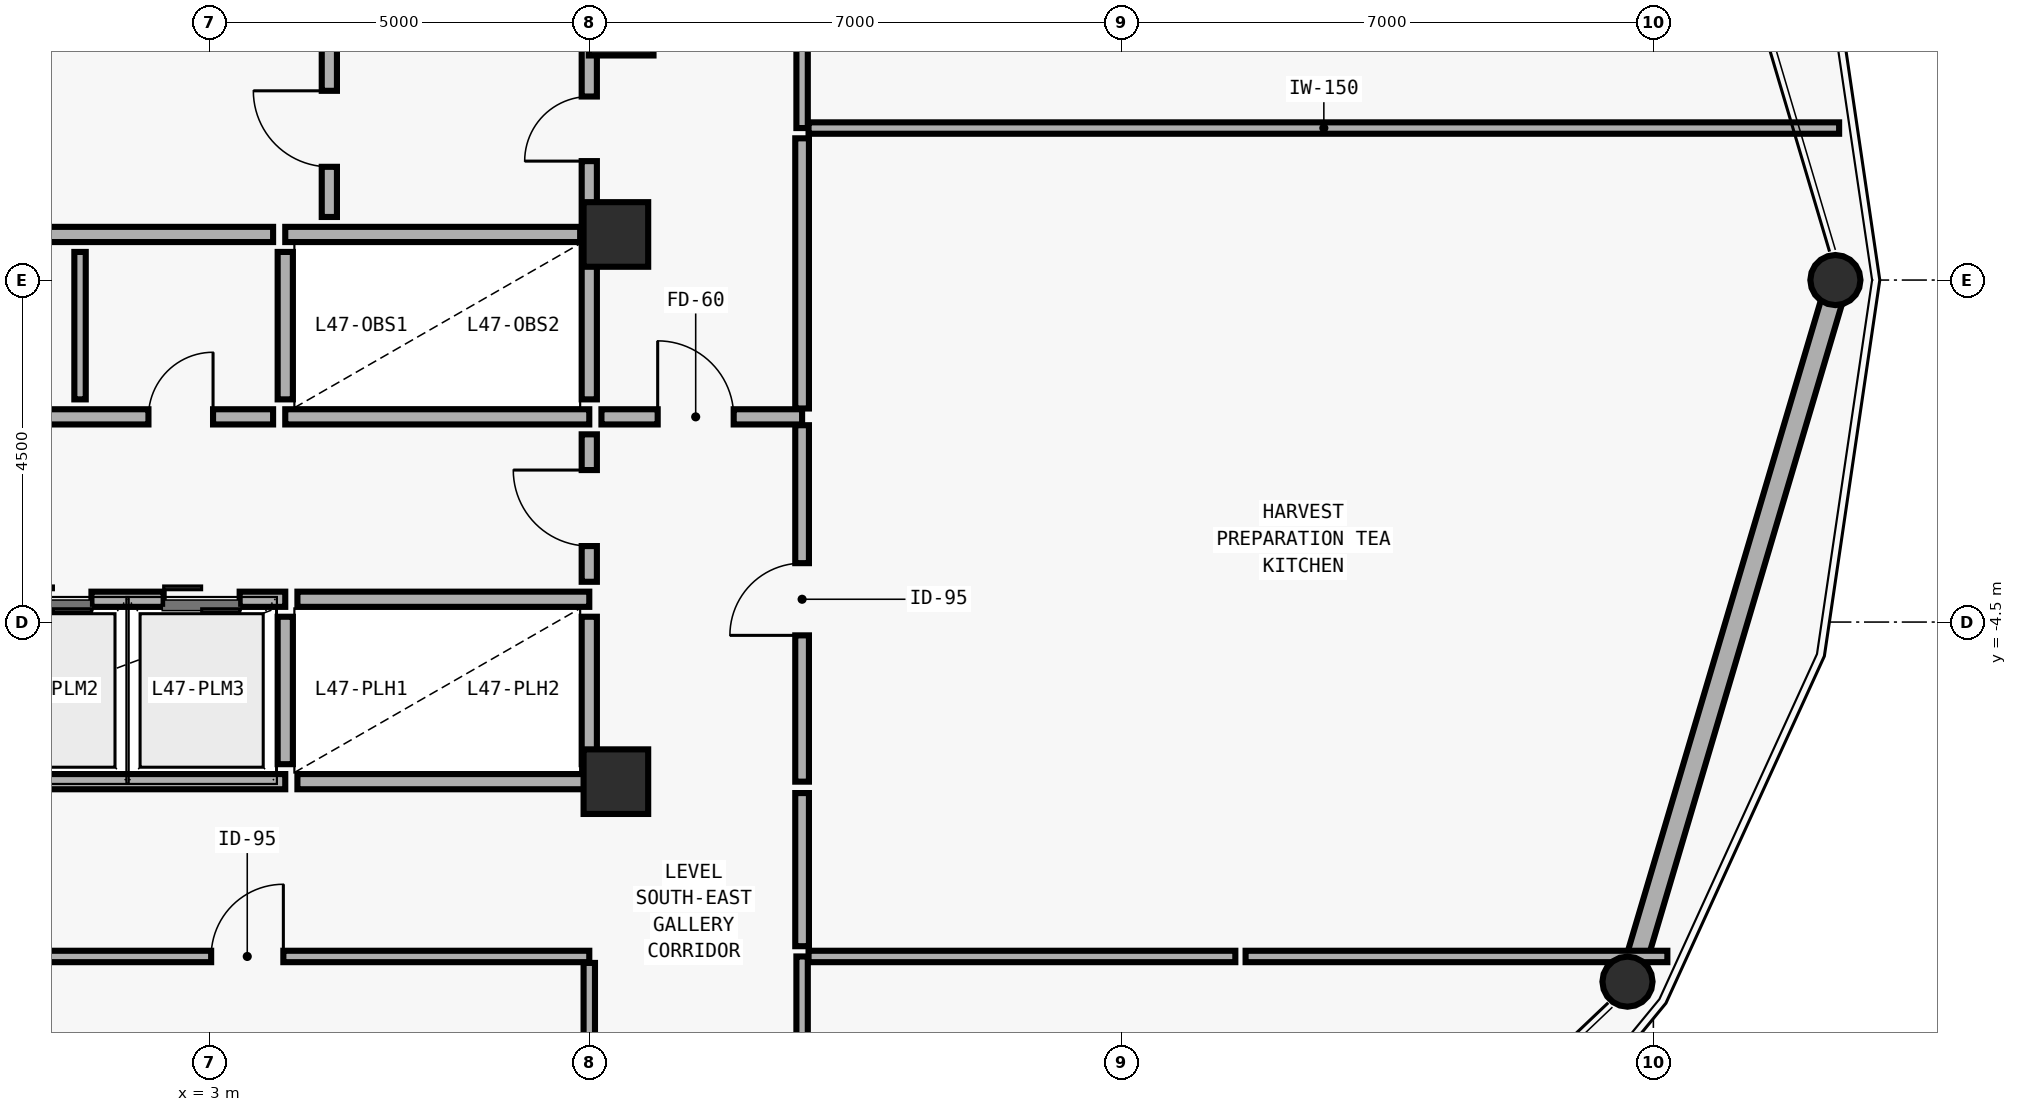
"""IFC4 building model, lengths in metres.
Left out: names, types, materials, properties, quantities, classifications, styles, units other than length and angle.
Written with IfcOpenShell. Run it as: python <this file> out.ifc"""

import sys

from ifc_helpers import new_model, si_unit, direction, frame, frame_2d, origin, origin_2d, place, context, subcontext, project, spatial, rectangle, hollow_circle, extrude, element, fill, save


model = new_model("IFC4")
c1 = context("Model", 3, precision=1e-05, world=origin(), true_north=direction((0.0, 1.0)))
c2 = subcontext(c1, "Body", "Model", "MODEL_VIEW")
j1 = project(units=[si_unit("LENGTHUNIT", "METRE"), si_unit("PLANEANGLEUNIT", "RADIAN")], contexts=[c1])
p1 = place(None, origin())
s1 = spatial("IfcSite", under=j1, at=p1, CompositionType="ELEMENT")
p2 = place(p1, origin())
s2 = spatial("IfcBuilding", under=s1, at=p2, CompositionType="ELEMENT")
p3 = place(p2, frame((0.0, 0.0, 189.6)))
s3 = spatial("IfcBuildingStorey", under=s2, at=p3, CompositionType="ELEMENT", Elevation=189.6)
for number, where, z_axis, x_axis in (
    (1, (8.42, 3.38, 0.0), (0.0, 0.0, 1.0), (1.0, 0.0, 0.0)),
    (2, (8.35, 0.6, 0.0), (0.0, 0.0, 1.0), (1.0, 0.0, 0.0)),
    (3, (8.35, -6.6, 0.0), (0.0, 0.0, 1.0), (1.0, 0.0, 0.0)),
):
    element("IfcColumn", number, at=place(p3, frame(where, z_axis=z_axis, x_axis=x_axis)), inside=s3, PredefinedType="COLUMN", context=c2, shape_type="SweptSolid", body=[
        extrude(rectangle(XDim=0.85, YDim=0.85, at=origin_2d()), origin(), (0.0, 0.0, 1.0), 3.575),
    ])
p4 = place(p3, frame((24.429, 0.0, 0.0), z_axis=(-0.018981760075, 0.0, 0.999819830162), x_axis=(0.0, -1.0, 0.0)))
e4 = element("IfcColumn", 4, at=p4, inside=s3, PredefinedType="COLUMN", context=c2, shape_type="SweptSolid", body=[
    extrude(hollow_circle(Radius=0.33, WallThickness=0.025, at=origin_2d()), origin(), (0.0, 0.0, 1.0), 3.576),
])
p5 = place(p3, frame((21.689, -9.24, 0.0), z_axis=(-0.016455959383, 0.00477973924, 0.999853166967), x_axis=(-0.278928739366, -0.960311802674, 0.0)))
e5 = element("IfcColumn", 5, at=p5, inside=s3, PredefinedType="COLUMN", context=c2, shape_type="SweptSolid", body=[
    extrude(hollow_circle(Radius=0.33, WallThickness=0.025, at=origin_2d()), origin(), (0.0, 0.0, 1.0), 3.575),
])
p6 = place(p3, frame((24.348, -0.273, 0.0), z_axis=(0.0, 0.0, 1.0), x_axis=(-0.2842909157, -0.958738063942, 0.0)))
e6 = element("IfcWall", 6, at=p6, inside=s3, PredefinedType="SOLIDWALL", context=c2, shape_type="SweptSolid", body=[
    extrude(rectangle(XDim=9.068, YDim=0.28, at=frame_2d((4.534, 0.0))), origin(), (0.0, 0.0, 1.0), 2.93),
])
p7 = place(p3, frame((4.0, 0.6, 0.0), z_axis=(0.0, 0.0, 1.0), x_axis=(1.0, 0.0, 0.0)))
e7 = element("IfcWall", 7, at=p7, inside=s3, PredefinedType="SOLIDWALL", context=c2, shape_type="SweptSolid", body=[
    extrude(rectangle(XDim=3.88, YDim=0.2, at=frame_2d((1.94, 0.0))), origin(), (0.0, 0.0, 1.0), 3.012),
])
p8 = place(p3, frame((4.0, -1.8, 0.0), z_axis=(0.0, 0.0, 1.0), x_axis=(1.0, 0.0, 0.0)))
e8 = element("IfcWall", 8, at=p8, inside=s3, PredefinedType="SOLIDWALL", context=c2, shape_type="SweptSolid", body=[
    extrude(rectangle(XDim=4.0, YDim=0.2, at=frame_2d((2.0, 0.0))), origin(), (0.0, 0.0, 1.0), 3.36),
])
p9 = place(p3, frame((4.0, -1.57, 0.0), z_axis=(0.0, 0.0, 1.0), x_axis=(0.0, 1.0, 0.0)))
e9 = element("IfcWall", 9, at=p9, inside=s3, PredefinedType="SOLIDWALL", context=c2, shape_type="SweptSolid", body=[
    extrude(rectangle(XDim=1.94, YDim=0.2, at=frame_2d((0.97, 0.0))), origin(), (0.0, 0.0, 1.0), 3.36),
])
p10 = place(p3, frame((8.0, -1.57, 0.0), z_axis=(0.0, 0.0, 1.0), x_axis=(0.0, 1.0, 0.0)))
e10 = element("IfcWall", 10, at=p10, inside=s3, PredefinedType="SOLIDWALL", context=c2, shape_type="SweptSolid", body=[
    extrude(rectangle(XDim=2.05, YDim=0.2, at=frame_2d((1.025, 0.0))), origin(), (0.0, 0.0, 1.0), 3.012),
])
p11 = place(p3, frame((-2.0, -4.2, 0.0), z_axis=(0.0, 0.0, 1.0), x_axis=(1.0, 0.0, 0.0)))
e11 = element("IfcWall", 11, at=p11, inside=s3, PredefinedType="SOLIDWALL", context=c2, shape_type="SweptSolid", body=[
    extrude(rectangle(XDim=6.0, YDim=0.2, at=frame_2d((3.0, 0.0))), origin(), (0.0, 0.0, 1.0), 3.36),
])
p12 = place(p11, frame((0.5, 0.0, 0.0)))
e12 = element("IfcOpeningElement", 12, at=p12, cuts=e11, PredefinedType="OPENING", context=c2, shape_type="SweptSolid", body=[
    extrude(rectangle(XDim=1.0, YDim=2.2, at=frame_2d((0.5, 1.1))), frame((0.0, 0.11, 0.0), z_axis=(0.0, -1.0, 0.0), x_axis=(1.0, 0.0, 0.0)), (0.0, 0.0, 1.0), 0.22),
])
p13 = place(p11, frame((2.45, 0.0, 0.0)))
e13 = element("IfcOpeningElement", 13, at=p13, cuts=e11, PredefinedType="OPENING", context=c2, shape_type="SweptSolid", body=[
    extrude(rectangle(XDim=1.0, YDim=2.2, at=frame_2d((0.5, 1.1))), frame((0.0, 0.11, 0.0), z_axis=(0.0, -1.0, 0.0), x_axis=(1.0, 0.0, 0.0)), (0.0, 0.0, 1.0), 0.22),
])
p14 = place(p11, frame((4.4, 0.0, 0.0)))
e14 = element("IfcOpeningElement", 14, at=p14, cuts=e11, PredefinedType="OPENING", context=c2, shape_type="SweptSolid", body=[
    extrude(rectangle(XDim=1.0, YDim=2.2, at=frame_2d((0.5, 1.1))), frame((0.0, 0.11, 0.0), z_axis=(0.0, -1.0, 0.0), x_axis=(1.0, 0.0, 0.0)), (0.0, 0.0, 1.0), 0.22),
])
p15 = place(p3, frame((-2.0, -6.6, 0.0), z_axis=(0.0, 0.0, 1.0), x_axis=(1.0, 0.0, 0.0)))
e15 = element("IfcWall", 15, at=p15, inside=s3, PredefinedType="SOLIDWALL", context=c2, shape_type="SweptSolid", body=[
    extrude(rectangle(XDim=6.0, YDim=0.2, at=frame_2d((3.0, 0.0))), origin(), (0.0, 0.0, 1.0), 3.012),
])
p16 = place(p3, frame((4.16, -4.2, 0.0), z_axis=(0.0, 0.0, 1.0), x_axis=(1.0, 0.0, 0.0)))
e16 = element("IfcWall", 16, at=p16, inside=s3, PredefinedType="SOLIDWALL", context=c2, shape_type="SweptSolid", body=[
    extrude(rectangle(XDim=3.84, YDim=0.2, at=frame_2d((1.92, 0.0))), origin(), (0.0, 0.0, 1.0), 3.36),
])
p17 = place(p3, frame((4.16, -6.6, 0.0), z_axis=(0.0, 0.0, 1.0), x_axis=(1.0, 0.0, 0.0)))
e17 = element("IfcWall", 17, at=p17, inside=s3, PredefinedType="SOLIDWALL", context=c2, shape_type="SweptSolid", body=[
    extrude(rectangle(XDim=3.84, YDim=0.2, at=frame_2d((1.92, 0.0))), origin(), (0.0, 0.0, 1.0), 3.012),
])
p18 = place(p3, frame((4.0, -6.37, 0.0), z_axis=(0.0, 0.0, 1.0), x_axis=(0.0, 1.0, 0.0)))
e18 = element("IfcWall", 18, at=p18, inside=s3, PredefinedType="SOLIDWALL", context=c2, shape_type="SweptSolid", body=[
    extrude(rectangle(XDim=1.94, YDim=0.2, at=frame_2d((0.97, 0.0))), origin(), (0.0, 0.0, 1.0), 3.36),
])
p19 = place(p3, frame((8.0, -6.37, 0.0), z_axis=(0.0, 0.0, 1.0), x_axis=(0.0, 1.0, 0.0)))
e19 = element("IfcWall", 19, at=p19, inside=s3, PredefinedType="SOLIDWALL", context=c2, shape_type="SweptSolid", body=[
    extrude(rectangle(XDim=1.94, YDim=0.2, at=frame_2d((0.97, 0.0))), origin(), (0.0, 0.0, 1.0), 3.012),
])
p20 = place(p3, frame((4.58, 0.83, 0.0), z_axis=(0.0, 0.0, 1.0), x_axis=(0.0, 1.0, 0.0)))
e20 = element("IfcWall", 20, at=p20, inside=s3, PredefinedType="MOVABLE", context=c2, shape_type="SweptSolid", body=[
    extrude(rectangle(XDim=2.24, YDim=0.2, at=frame_2d((1.12, 0.0))), origin(), (0.0, 0.0, 1.0), 3.36),
])
p21 = place(p20, frame((0.66, 0.0, 0.0)))
e21 = element("IfcOpeningElement", 21, at=p21, cuts=e20, PredefinedType="OPENING", context=c2, shape_type="SweptSolid", body=[
    extrude(rectangle(XDim=1.0, YDim=2.1, at=frame_2d((0.5, 1.05))), frame((0.0, 0.11, 0.0), z_axis=(0.0, -1.0, 0.0), x_axis=(1.0, 0.0, 0.0)), (0.0, 0.0, 1.0), 0.22),
])
p22 = place(p3, frame((8.0, 0.72, 0.0), z_axis=(0.0, 0.0, 1.0), x_axis=(0.0, 1.0, 0.0)))
e22 = element("IfcWall", 22, at=p22, inside=s3, PredefinedType="MOVABLE", context=c2, shape_type="SweptSolid", body=[
    extrude(rectangle(XDim=2.35, YDim=0.2, at=frame_2d((1.175, 0.0))), origin(), (0.0, 0.0, 1.0), 2.692),
])
p23 = place(p22, frame((0.845, 0.0, 0.0)))
e23 = element("IfcOpeningElement", 23, at=p23, cuts=e22, PredefinedType="OPENING", context=c2, shape_type="SweptSolid", body=[
    extrude(rectangle(XDim=0.85, YDim=2.1, at=frame_2d((0.425, 1.05))), frame((0.0, 0.11, 0.0), z_axis=(0.0, -1.0, 0.0), x_axis=(1.0, 0.0, 0.0)), (0.0, 0.0, 1.0), 0.22),
])
p24 = place(p3, frame((8.0, -3.97, 0.0), z_axis=(0.0, 0.0, 1.0), x_axis=(0.0, 1.0, 0.0)))
e24 = element("IfcWall", 24, at=p24, inside=s3, PredefinedType="MOVABLE", context=c2, shape_type="SweptSolid", body=[
    extrude(rectangle(XDim=1.94, YDim=0.2, at=frame_2d((0.97, 0.0))), origin(), (0.0, 0.0, 1.0), 3.012),
])
p25 = place(p24, frame((0.47, 0.0, 0.0)))
e25 = element("IfcOpeningElement", 25, at=p25, cuts=e24, PredefinedType="OPENING", context=c2, shape_type="SweptSolid", body=[
    extrude(rectangle(XDim=1.0, YDim=2.1, at=frame_2d((0.5, 1.05))), frame((0.0, 0.11, 0.0), z_axis=(0.0, -1.0, 0.0), x_axis=(1.0, 0.0, 0.0)), (0.0, 0.0, 1.0), 0.22),
])
p26 = place(p3, frame((-2.0, -1.8, 0.0), z_axis=(0.0, 0.0, 1.0), x_axis=(1.0, 0.0, 0.0)))
e26 = element("IfcWall", 26, at=p26, inside=s3, PredefinedType="MOVABLE", context=c2, shape_type="SweptSolid", body=[
    extrude(rectangle(XDim=5.84, YDim=0.2, at=frame_2d((2.92, 0.0))), origin(), (0.0, 0.0, 1.0), 3.36),
])
p27 = place(p26, frame((1.15, 0.0, 0.0)))
e27 = element("IfcOpeningElement", 27, at=p27, cuts=e26, PredefinedType="OPENING", context=c2, shape_type="SweptSolid", body=[
    extrude(rectangle(XDim=0.85, YDim=2.1, at=frame_2d((0.425, 1.05))), frame((0.0, 0.11, 0.0), z_axis=(0.0, -1.0, 0.0), x_axis=(1.0, 0.0, 0.0)), (0.0, 0.0, 1.0), 0.22),
])
p28 = place(p26, frame((4.2, 0.0, 0.0)))
e28 = element("IfcOpeningElement", 28, at=p28, cuts=e26, PredefinedType="OPENING", context=c2, shape_type="SweptSolid", body=[
    extrude(rectangle(XDim=0.85, YDim=2.1, at=frame_2d((0.425, 1.05))), frame((0.0, 0.11, 0.0), z_axis=(0.0, -1.0, 0.0), x_axis=(1.0, 0.0, 0.0)), (0.0, 0.0, 1.0), 0.22),
])
p29 = place(p3, frame((8.16, -1.8, 0.0), z_axis=(0.0, 0.0, 1.0), x_axis=(1.0, 0.0, 0.0)))
e29 = element("IfcWall", 29, at=p29, inside=s3, PredefinedType="MOVABLE", context=c2, shape_type="SweptSolid", body=[
    extrude(rectangle(XDim=2.64, YDim=0.2, at=frame_2d((1.32, 0.0))), origin(), (0.0, 0.0, 1.0), 3.36),
])
p30 = place(p29, frame((0.74, 0.0, 0.0)))
e30 = element("IfcOpeningElement", 30, at=p30, cuts=e29, PredefinedType="OPENING", context=c2, shape_type="SweptSolid", body=[
    extrude(rectangle(XDim=1.0, YDim=2.1, at=frame_2d((0.5, 1.05))), frame((0.0, 0.11, 0.0), z_axis=(0.0, -1.0, 0.0), x_axis=(1.0, 0.0, 0.0)), (0.0, 0.0, 1.0), 0.22),
])
p31 = place(p3, frame((-0.865, -8.9, 0.0), z_axis=(0.0, 0.0, 1.0), x_axis=(1.0, 0.0, 0.0)))
e31 = element("IfcWall", 31, at=p31, inside=s3, PredefinedType="PARTITIONING", context=c2, shape_type="SweptSolid", body=[
    extrude(rectangle(XDim=8.865, YDim=0.15, at=frame_2d((4.433, 0.0))), origin(), (0.0, 0.0, 1.0), 3.36),
])
p32 = place(p31, frame((3.89, 0.0, 0.0)))
e32 = element("IfcOpeningElement", 32, at=p32, cuts=e31, PredefinedType="OPENING", context=c2, shape_type="SweptSolid", body=[
    extrude(rectangle(XDim=0.95, YDim=2.1, at=frame_2d((0.475, 1.05))), frame((0.0, 0.085, 0.0), z_axis=(0.0, -1.0, 0.0), x_axis=(1.0, 0.0, 0.0)), (0.0, 0.0, 1.0), 0.17),
])
p33 = place(p3, frame((10.8, -15.2, 0.0), z_axis=(0.0, 0.0, 1.0), x_axis=(0.0, 1.0, 0.0)))
e33 = element("IfcWall", 33, at=p33, inside=s3, PredefinedType="PARTITIONING", context=c2, shape_type="SweptSolid", body=[
    extrude(rectangle(XDim=6.3, YDim=0.15, at=frame_2d((3.15, 0.0))), origin(), (0.0, 0.0, 1.0), 3.36),
])
p34 = place(p33, frame((2.675, 0.0, 0.0)))
e34 = element("IfcOpeningElement", 34, at=p34, cuts=e33, PredefinedType="OPENING", context=c2, shape_type="SweptSolid", body=[
    extrude(rectangle(XDim=0.95, YDim=2.1, at=frame_2d((0.475, 1.05))), frame((0.0, 0.085, 0.0), z_axis=(0.0, -1.0, 0.0), x_axis=(1.0, 0.0, 0.0)), (0.0, 0.0, 1.0), 0.17),
])
p35 = place(p3, frame((10.8, -6.6, 0.0), z_axis=(0.0, 0.0, 1.0), x_axis=(0.0, 1.0, 0.0)))
e35 = element("IfcWall", 35, at=p35, inside=s3, PredefinedType="PLUMBINGWALL", context=c2, shape_type="SweptSolid", body=[
    extrude(rectangle(XDim=4.69, YDim=0.18, at=frame_2d((2.345, 0.0))), origin(), (0.0, 0.0, 1.0), 3.36),
])
p36 = place(p35, frame((1.925, 0.0, 0.0)))
e36 = element("IfcOpeningElement", 36, at=p36, cuts=e35, PredefinedType="OPENING", context=c2, shape_type="SweptSolid", body=[
    extrude(rectangle(XDim=0.95, YDim=2.1, at=frame_2d((0.475, 1.05))), frame((0.0, 0.1, 0.0), z_axis=(0.0, -1.0, 0.0), x_axis=(1.0, 0.0, 0.0)), (0.0, 0.0, 1.0), 0.2),
])
p37 = place(p3, frame((10.8, 2.0, 0.0), z_axis=(0.0, 0.0, 1.0), x_axis=(0.0, 1.0, 0.0)))
e37 = element("IfcWall", 37, at=p37, inside=s3, PredefinedType="PARTITIONING", context=c2, shape_type="SweptSolid", body=[
    extrude(rectangle(XDim=10.5, YDim=0.15, at=frame_2d((5.25, 0.0))), origin(), (0.0, 0.0, 1.0), 3.36),
])
p38 = place(p37, frame((4.775, 0.0, 0.0)))
e38 = element("IfcOpeningElement", 38, at=p38, cuts=e37, PredefinedType="OPENING", context=c2, shape_type="SweptSolid", body=[
    extrude(rectangle(XDim=0.95, YDim=2.1, at=frame_2d((0.475, 1.05))), frame((0.0, 0.085, 0.0), z_axis=(0.0, -1.0, 0.0), x_axis=(1.0, 0.0, 0.0)), (0.0, 0.0, 1.0), 0.17),
])
p39 = place(p3, frame((-1.88, 0.6, 0.0), z_axis=(0.0, 0.0, 1.0), x_axis=(1.0, 0.0, 0.0)))
e39 = element("IfcWall", 39, at=p39, inside=s3, PredefinedType="MOVABLE", context=c2, shape_type="SweptSolid", body=[
    extrude(rectangle(XDim=5.72, YDim=0.2, at=frame_2d((2.86, 0.0))), origin(), (0.0, 0.0, 1.0), 3.012),
])
p40 = place(p3, frame((1.3, -1.57, 0.0), z_axis=(0.0, 0.0, 1.0), x_axis=(0.0, 1.0, 0.0)))
e40 = element("IfcWall", 40, at=p40, inside=s3, PredefinedType="PARTITIONING", context=c2, shape_type="SweptSolid", body=[
    extrude(rectangle(XDim=1.94, YDim=0.15, at=frame_2d((0.97, 0.0))), origin(), (0.0, 0.0, 1.0), 3.36),
])
p41 = place(p3, frame((8.0, -8.985, 0.0), z_axis=(0.0, 0.0, 1.0), x_axis=(0.0, -1.0, 0.0)))
e41 = element("IfcWall", 41, at=p41, inside=s3, PredefinedType="PARTITIONING", context=c2, shape_type="SweptSolid", body=[
    extrude(rectangle(XDim=6.215, YDim=0.15, at=frame_2d((3.107, 0.0))), origin(), (0.0, 0.0, 1.0), 2.842),
])
p42 = place(p3, frame((10.885, -8.9, 0.0), z_axis=(0.0, 0.0, 1.0), x_axis=(1.0, 0.0, 0.0)))
e42 = element("IfcWall", 42, at=p42, inside=s3, PredefinedType="PARTITIONING", context=c2, shape_type="SweptSolid", body=[
    extrude(rectangle(XDim=5.615, YDim=0.15, at=frame_2d((2.808, 0.0))), origin(), (0.0, 0.0, 1.0), 2.842),
])
p43 = place(p3, frame((16.635, -8.9, 0.0), z_axis=(0.0, 0.0, 1.0), x_axis=(1.0, 0.0, 0.0)))
e43 = element("IfcWall", 43, at=p43, inside=s3, PredefinedType="PARTITIONING", context=c2, shape_type="SweptSolid", body=[
    extrude(rectangle(XDim=5.549, YDim=0.15, at=frame_2d((2.774, 0.0))), origin(), (0.0, 0.0, 1.0), 2.842),
])
p44 = place(p3, frame((10.8, -8.765, 0.0), z_axis=(0.0, 0.0, 1.0), x_axis=(0.0, 1.0, 0.0)))
e44 = element("IfcWall", 44, at=p44, inside=s3, PredefinedType="PLUMBINGWALL", context=c2, shape_type="SweptSolid", body=[
    extrude(rectangle(XDim=2.015, YDim=0.18, at=frame_2d((1.007, 0.0))), origin(), (0.0, 0.0, 1.0), 3.36),
])
p45 = place(p3, frame((10.8, -1.69, 0.0), z_axis=(0.0, 0.0, 1.0), x_axis=(0.0, 1.0, 0.0)))
e45 = element("IfcWall", 45, at=p45, inside=s3, PredefinedType="PLUMBINGWALL", context=c2, shape_type="SweptSolid", body=[
    extrude(rectangle(XDim=3.555, YDim=0.18, at=frame_2d((1.777, 0.0))), origin(), (0.0, 0.0, 1.0), 3.36),
])
p46 = place(p3, frame((10.885, 2.0, 0.0), z_axis=(0.0, 0.0, 1.0), x_axis=(1.0, 0.0, 0.0)))
e46 = element("IfcWall", 46, at=p46, inside=s3, PredefinedType="PARTITIONING", context=c2, shape_type="SweptSolid", body=[
    extrude(rectangle(XDim=13.559, YDim=0.15, at=frame_2d((6.78, 0.0))), origin(), (0.0, 0.0, 1.0), 3.36),
])
p47 = place(p21, origin())
e47 = element("IfcDoor", 47, at=p47, inside=s3, OperationType="SINGLE_SWING_RIGHT", PredefinedType="DOOR", context=c2, shape_type="SweptSolid", body=[
    extrude(rectangle(XDim=1.0, YDim=2.1, at=frame_2d((0.5, 1.05))), frame((0.0, 0.025, 0.0), z_axis=(0.0, -1.0, 0.0), x_axis=(1.0, 0.0, 0.0)), (0.0, 0.0, 1.0), 0.05),
])
fill(e21, e47)
p48 = place(p23, origin())
e48 = element("IfcDoor", 48, at=p48, inside=s3, OperationType="SINGLE_SWING_LEFT", PredefinedType="DOOR", context=c2, shape_type="SweptSolid", body=[
    extrude(rectangle(XDim=0.85, YDim=2.1, at=frame_2d((0.425, 1.05))), frame((0.0, 0.025, 0.0), z_axis=(0.0, -1.0, 0.0), x_axis=(1.0, 0.0, 0.0)), (0.0, 0.0, 1.0), 0.05),
])
fill(e23, e48)
p49 = place(p25, origin())
e49 = element("IfcDoor", 49, at=p49, inside=s3, OperationType="SINGLE_SWING_RIGHT", PredefinedType="DOOR", context=c2, shape_type="SweptSolid", body=[
    extrude(rectangle(XDim=1.0, YDim=2.1, at=frame_2d((0.5, 1.05))), frame((0.0, 0.025, 0.0), z_axis=(0.0, -1.0, 0.0), x_axis=(1.0, 0.0, 0.0)), (0.0, 0.0, 1.0), 0.05),
])
fill(e25, e49)
p50 = place(p28, origin())
e50 = element("IfcDoor", 50, at=p50, inside=s3, OperationType="SINGLE_SWING_RIGHT", PredefinedType="DOOR", context=c2, shape_type="SweptSolid", body=[
    extrude(rectangle(XDim=0.85, YDim=2.1, at=frame_2d((0.425, 1.05))), frame((0.0, 0.025, 0.0), z_axis=(0.0, -1.0, 0.0), x_axis=(1.0, 0.0, 0.0)), (0.0, 0.0, 1.0), 0.05),
])
fill(e28, e50)
p51 = place(p30, origin())
e51 = element("IfcDoor", 51, at=p51, inside=s3, OperationType="SINGLE_SWING_LEFT", PredefinedType="DOOR", context=c2, shape_type="SweptSolid", body=[
    extrude(rectangle(XDim=1.0, YDim=2.1, at=frame_2d((0.5, 1.05))), frame((0.0, 0.025, 0.0), z_axis=(0.0, -1.0, 0.0), x_axis=(1.0, 0.0, 0.0)), (0.0, 0.0, 1.0), 0.05),
])
fill(e30, e51)
p52 = place(p32, origin())
e52 = element("IfcDoor", 52, at=p52, inside=s3, OperationType="SINGLE_SWING_RIGHT", PredefinedType="DOOR", context=c2, shape_type="SweptSolid", body=[
    extrude(rectangle(XDim=0.95, YDim=2.1, at=frame_2d((0.475, 1.05))), frame((0.0, 0.025, 0.0), z_axis=(0.0, -1.0, 0.0), x_axis=(1.0, 0.0, 0.0)), (0.0, 0.0, 1.0), 0.05),
])
fill(e32, e52)
p53 = place(p36, origin())
e53 = element("IfcDoor", 53, at=p53, inside=s3, OperationType="SINGLE_SWING_LEFT", PredefinedType="DOOR", context=c2, shape_type="SweptSolid", body=[
    extrude(rectangle(XDim=0.95, YDim=2.1, at=frame_2d((0.475, 1.05))), frame((0.0, 0.025, 0.0), z_axis=(0.0, -1.0, 0.0), x_axis=(1.0, 0.0, 0.0)), (0.0, 0.0, 1.0), 0.05),
])
fill(e36, e53)
p54 = place(p13, origin())
e54 = element("IfcDoor", 54, at=p54, inside=s3, OperationType="DOUBLE_DOOR_SLIDING", PredefinedType="DOOR", context=c2, shape_type="SweptSolid", body=[
    extrude(rectangle(XDim=1.0, YDim=2.2, at=frame_2d((0.5, 1.1))), frame((0.0, 0.025, 0.0), z_axis=(0.0, -1.0, 0.0), x_axis=(1.0, 0.0, 0.0)), (0.0, 0.0, 1.0), 0.05),
])
fill(e13, e54)
p55 = place(p14, origin())
e55 = element("IfcDoor", 55, at=p55, inside=s3, OperationType="DOUBLE_DOOR_SLIDING", PredefinedType="DOOR", context=c2, shape_type="SweptSolid", body=[
    extrude(rectangle(XDim=1.0, YDim=2.2, at=frame_2d((0.5, 1.1))), frame((0.0, 0.025, 0.0), z_axis=(0.0, -1.0, 0.0), x_axis=(1.0, 0.0, 0.0)), (0.0, 0.0, 1.0), 0.05),
])
fill(e14, e55)
save(model, sys.argv[1])
